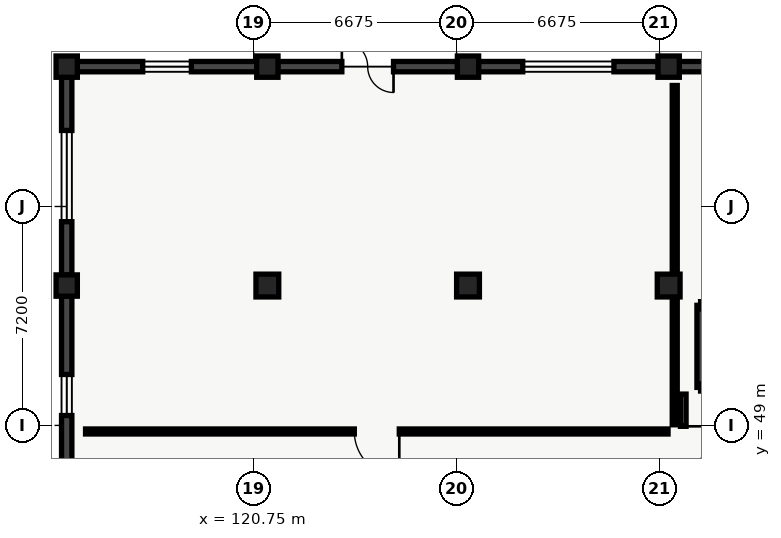
"""IFC4 building model, lengths in metres.
Left out: names, types, materials, properties, quantities, classifications, styles, units other than length and angle.
Written with IfcOpenShell. Run it as: python <this file> out.ifc"""

import sys

from ifc_helpers import new_model, si_unit, direction, frame, frame_2d, origin, origin_2d, place, context, subcontext, project, spatial, rectangle, extrude, element, fill, save


model = new_model("IFC4")
c1 = context("Model", 3, precision=1e-05, world=origin(), true_north=direction((0.0, 1.0)))
c2 = subcontext(c1, "Body", "Model", "MODEL_VIEW")
j1 = project(units=[si_unit("LENGTHUNIT", "METRE"), si_unit("PLANEANGLEUNIT", "RADIAN")], contexts=[c1])
p1 = place(None, origin())
s1 = spatial("IfcSite", under=j1, at=p1, CompositionType="ELEMENT")
p2 = place(p1, origin())
s2 = spatial("IfcBuilding", under=s1, at=p2, CompositionType="ELEMENT")
p3 = place(p2, origin())
s3 = spatial("IfcBuildingStorey", under=s2, at=p3, CompositionType="ELEMENT", Elevation=0.0)
for number, where, z_axis, x_axis in (
    (1, (114.6, 53.6, 0.0), (0.0, 0.0, 1.0), (1.0, 0.0, 0.0)),
    (2, (114.6, 60.8, 0.0), (0.0, 0.0, 1.0), (1.0, 0.0, 0.0)),
):
    element("IfcColumn", number, at=place(p3, frame(where, z_axis=z_axis, x_axis=x_axis)), inside=s3, PredefinedType="COLUMN", context=c2, shape_type="SweptSolid", body=[
        extrude(rectangle(XDim=0.7, YDim=0.7, at=origin_2d()), origin(), (0.0, 0.0, 1.0), 4.9),
    ])
p4 = place(p3, frame((121.2, 53.6, 0.0), z_axis=(0.0, 0.0, 1.0), x_axis=(1.0, 0.0, 0.0)))
e3 = element("IfcColumn", 3, at=p4, inside=s3, PredefinedType="COLUMN", context=c2, shape_type="SweptSolid", body=[
    extrude(rectangle(XDim=0.75, YDim=0.75, at=origin_2d()), origin(), (0.0, 0.0, 1.0), 4.9),
])
p5 = place(p3, frame((121.2, 60.8, 0.0), z_axis=(0.0, 0.0, 1.0), x_axis=(1.0, 0.0, 0.0)))
e4 = element("IfcColumn", 4, at=p5, inside=s3, PredefinedType="COLUMN", context=c2, shape_type="SweptSolid", body=[
    extrude(rectangle(XDim=0.7, YDim=0.7, at=origin_2d()), origin(), (0.0, 0.0, 1.0), 4.9),
])
p6 = place(p3, frame((127.8, 53.6, 0.0), z_axis=(0.0, 0.0, 1.0), x_axis=(1.0, 0.0, 0.0)))
e5 = element("IfcColumn", 5, at=p6, inside=s3, PredefinedType="COLUMN", context=c2, shape_type="SweptSolid", body=[
    extrude(rectangle(XDim=0.75, YDim=0.75, at=origin_2d()), origin(), (0.0, 0.0, 1.0), 4.9),
])
p7 = place(p3, frame((127.8, 60.8, 0.0), z_axis=(0.0, 0.0, 1.0), x_axis=(1.0, 0.0, 0.0)))
e6 = element("IfcColumn", 6, at=p7, inside=s3, PredefinedType="COLUMN", context=c2, shape_type="SweptSolid", body=[
    extrude(rectangle(XDim=0.7, YDim=0.7, at=origin_2d()), origin(), (0.0, 0.0, 1.0), 4.9),
])
p8 = place(p3, frame((134.4, 53.6, 0.0), z_axis=(0.0, 0.0, 1.0), x_axis=(1.0, 0.0, 0.0)))
e7 = element("IfcColumn", 7, at=p8, inside=s3, PredefinedType="COLUMN", context=c2, shape_type="SweptSolid", body=[
    extrude(rectangle(XDim=0.75, YDim=0.75, at=origin_2d()), origin(), (0.0, 0.0, 1.0), 4.9),
])
p9 = place(p3, frame((134.4, 60.8, 0.0), z_axis=(0.0, 0.0, 1.0), x_axis=(1.0, 0.0, 0.0)))
e8 = element("IfcColumn", 8, at=p9, inside=s3, PredefinedType="COLUMN", context=c2, shape_type="SweptSolid", body=[
    extrude(rectangle(XDim=0.7, YDim=0.7, at=origin_2d()), origin(), (0.0, 0.0, 1.0), 4.9),
])
p10 = place(p3, frame((114.6, 46.745, 0.0), z_axis=(0.0, 0.0, 1.0), x_axis=(0.0, 1.0, 0.0)))
e9 = element("IfcWall", 9, at=p10, inside=s3, PredefinedType="SOLIDWALL", context=c2, shape_type="SweptSolid", body=[
    extrude(rectangle(XDim=6.51, YDim=0.34, at=frame_2d((3.255, 0.0))), origin(), (0.0, 0.0, 1.0), 4.435),
])
p11 = place(p10, frame((2.58, 0.0, 0.95)))
e10 = element("IfcOpeningElement", 10, at=p11, cuts=e9, PredefinedType="OPENING", context=c2, shape_type="SweptSolid", body=[
    extrude(rectangle(XDim=1.35, YDim=1.8, at=frame_2d((0.675, 0.9))), frame((0.0, 0.17, 0.0), z_axis=(0.0, -1.0, 0.0), x_axis=(1.0, 0.0, 0.0)), (0.0, 0.0, 1.0), 0.34),
])
p12 = place(p3, frame((114.6, 53.945, 0.0), z_axis=(0.0, 0.0, 1.0), x_axis=(0.0, 1.0, 0.0)))
e11 = element("IfcWall", 11, at=p12, inside=s3, PredefinedType="SOLIDWALL", context=c2, shape_type="SweptSolid", body=[
    extrude(rectangle(XDim=6.51, YDim=0.34, at=frame_2d((3.255, 0.0))), origin(), (0.0, 0.0, 1.0), 4.435),
])
p13 = place(p12, frame((1.755, 0.0, 0.95)))
e12 = element("IfcOpeningElement", 12, at=p13, cuts=e11, PredefinedType="OPENING", context=c2, shape_type="SweptSolid", body=[
    extrude(rectangle(XDim=3.0, YDim=1.65, at=frame_2d((1.5, 0.825))), frame((0.0, 0.17, 0.0), z_axis=(0.0, -1.0, 0.0), x_axis=(1.0, 0.0, 0.0)), (0.0, 0.0, 1.0), 0.34),
])
p14 = place(p3, frame((114.945, 60.8, 0.0), z_axis=(0.0, 0.0, 1.0), x_axis=(1.0, 0.0, 0.0)))
e13 = element("IfcWall", 13, at=p14, inside=s3, PredefinedType="SOLIDWALL", context=c2, shape_type="SweptSolid", body=[
    extrude(rectangle(XDim=5.91, YDim=0.34, at=frame_2d((2.955, 0.0))), origin(), (0.0, 0.0, 1.0), 4.435),
])
p15 = place(p14, frame((2.155, 0.0, 0.95)))
e14 = element("IfcOpeningElement", 14, at=p15, cuts=e13, PredefinedType="OPENING", context=c2, shape_type="SweptSolid", body=[
    extrude(rectangle(XDim=1.6, YDim=1.4, at=frame_2d((0.8, 0.7))), frame((0.0, 0.17, 0.0), z_axis=(0.0, -1.0, 0.0), x_axis=(1.0, 0.0, 0.0)), (0.0, 0.0, 1.0), 0.34),
])
p16 = place(p3, frame((121.545, 60.8, 0.0), z_axis=(0.0, 0.0, 1.0), x_axis=(1.0, 0.0, 0.0)))
e15 = element("IfcWall", 15, at=p16, inside=s3, PredefinedType="SOLIDWALL", context=c2, shape_type="SweptSolid", body=[
    extrude(rectangle(XDim=5.91, YDim=0.34, at=frame_2d((2.955, 0.0))), origin(), (0.0, 0.0, 1.0), 4.435),
])
p17 = place(p16, frame((2.105, 0.0, 0.0)))
e16 = element("IfcOpeningElement", 16, at=p17, cuts=e15, PredefinedType="OPENING", context=c2, shape_type="SweptSolid", body=[
    extrude(rectangle(XDim=1.7, YDim=2.2, at=frame_2d((0.85, 1.1))), frame((0.0, 0.17, 0.0), z_axis=(0.0, -1.0, 0.0), x_axis=(1.0, 0.0, 0.0)), (0.0, 0.0, 1.0), 0.34),
])
p18 = place(p3, frame((128.145, 60.8, 0.0), z_axis=(0.0, 0.0, 1.0), x_axis=(1.0, 0.0, 0.0)))
e17 = element("IfcWall", 17, at=p18, inside=s3, PredefinedType="SOLIDWALL", context=c2, shape_type="SweptSolid", body=[
    extrude(rectangle(XDim=5.91, YDim=0.34, at=frame_2d((2.955, 0.0))), origin(), (0.0, 0.0, 1.0), 4.435),
])
p19 = place(p18, frame((1.455, 0.0, 0.95)))
e18 = element("IfcOpeningElement", 18, at=p19, cuts=e17, PredefinedType="OPENING", context=c2, shape_type="SweptSolid", body=[
    extrude(rectangle(XDim=3.0, YDim=1.65, at=frame_2d((1.5, 0.825))), frame((0.0, 0.17, 0.0), z_axis=(0.0, -1.0, 0.0), x_axis=(1.0, 0.0, 0.0)), (0.0, 0.0, 1.0), 0.34),
])
p20 = place(p3, frame((134.745, 60.8, 0.0), z_axis=(0.0, 0.0, 1.0), x_axis=(1.0, 0.0, 0.0)))
e19 = element("IfcWall", 19, at=p20, inside=s3, PredefinedType="SOLIDWALL", context=c2, shape_type="SweptSolid", body=[
    extrude(rectangle(XDim=5.91, YDim=0.34, at=frame_2d((2.955, 0.0))), origin(), (0.0, 0.0, 1.0), 4.435),
])
p21 = place(p20, frame((2.43, 0.0, 0.95)))
e20 = element("IfcOpeningElement", 20, at=p21, cuts=e19, PredefinedType="OPENING", context=c2, shape_type="SweptSolid", body=[
    extrude(rectangle(XDim=1.05, YDim=1.2, at=frame_2d((0.525, 0.6))), frame((0.0, 0.17, 0.0), z_axis=(0.0, -1.0, 0.0), x_axis=(1.0, 0.0, 0.0)), (0.0, 0.0, 1.0), 0.34),
])
p22 = place(p3, frame((135.45, 50.25, 0.0), z_axis=(0.0, 0.0, 1.0), x_axis=(0.0, 1.0, 0.0)))
e21 = element("IfcWall", 21, at=p22, inside=s3, PredefinedType="SHEAR", context=c2, shape_type="SweptSolid", body=[
    extrude(rectangle(XDim=2.7, YDim=0.24, at=frame_2d((1.35, 0.0))), origin(), (0.0, 0.0, 1.0), 4.88),
])
p23 = place(p3, frame((135.45, 52.95, 0.0), z_axis=(0.0, 0.0, 1.0), x_axis=(1.0, 0.0, 0.0)))
e22 = element("IfcWall", 22, at=p23, inside=s3, PredefinedType="SHEAR", context=c2, shape_type="SweptSolid", body=[
    extrude(rectangle(XDim=1.9, YDim=0.24, at=frame_2d((0.95, 0.0))), origin(), (0.0, 0.0, 1.0), 4.88),
])
p24 = place(p3, frame((137.35, 50.25, 0.0), z_axis=(0.0, 0.0, 1.0), x_axis=(-1.0, 0.0, 0.0)))
e23 = element("IfcWall", 23, at=p24, inside=s3, PredefinedType="SHEAR", context=c2, shape_type="SweptSolid", body=[
    extrude(rectangle(XDim=1.9, YDim=0.24, at=frame_2d((0.95, 0.0))), origin(), (0.0, 0.0, 1.0), 4.88),
])
p25 = place(p24, frame((0.325, 0.0, 0.0)))
e24 = element("IfcOpeningElement", 24, at=p25, cuts=e23, PredefinedType="OPENING", context=c2, shape_type="SweptSolid", body=[
    extrude(rectangle(XDim=1.25, YDim=2.2, at=frame_2d((0.625, 1.1))), frame((0.0, 0.12, 0.0), z_axis=(0.0, -1.0, 0.0), x_axis=(1.0, 0.0, 0.0)), (0.0, 0.0, 1.0), 0.24),
])
p26 = place(p3, frame((134.88, 50.03, 0.0), z_axis=(0.0, 0.0, 1.0), x_axis=(0.0, -1.0, 0.0)))
e25 = element("IfcWall", 25, at=p26, inside=s3, PredefinedType="SOLIDWALL", context=c2, shape_type="SweptSolid", body=[
    extrude(rectangle(XDim=2.51, YDim=0.185, at=frame_2d((1.255, 0.0))), origin(), (0.0, 0.0, 1.0), 4.55),
])
p27 = place(p26, frame((1.06, 0.0, 0.0)))
e26 = element("IfcOpeningElement", 26, at=p27, cuts=e25, PredefinedType="OPENING", context=c2, shape_type="SweptSolid", body=[
    extrude(rectangle(XDim=1.2, YDim=2.15, at=frame_2d((0.6, 1.075))), frame((0.0, 0.093, 0.0), z_axis=(0.0, -1.0, 0.0), x_axis=(1.0, 0.0, 0.0)), (0.0, 0.0, 1.0), 0.185),
])
p28 = place(p3, frame((115.22, 48.8, 0.0), z_axis=(0.0, 0.0, 1.0), x_axis=(1.0, 0.0, 0.0)))
e27 = element("IfcWall", 27, at=p28, inside=s3, PredefinedType="PARTITIONING", context=c2, shape_type="SweptSolid", body=[
    extrude(rectangle(XDim=19.16, YDim=0.165, at=frame_2d((9.58, 0.0))), origin(), (0.0, 0.0, 1.0), 4.485),
])
p29 = place(p28, frame((8.84, 0.0, 0.0)))
e28 = element("IfcOpeningElement", 28, at=p29, cuts=e27, PredefinedType="OPENING", context=c2, shape_type="SweptSolid", body=[
    extrude(rectangle(XDim=1.48, YDim=2.1, at=frame_2d((0.74, 1.05))), frame((0.0, 0.083, 0.0), z_axis=(0.0, -1.0, 0.0), x_axis=(1.0, 0.0, 0.0)), (0.0, 0.0, 1.0), 0.165),
])
p30 = place(p3, frame((134.6, 49.02, 0.0), z_axis=(0.0, 0.0, 1.0), x_axis=(0.0, 1.0, 0.0)))
e29 = element("IfcWall", 29, at=p30, inside=s3, PredefinedType="PARTITIONING", context=c2, shape_type="SweptSolid", body=[
    extrude(rectangle(XDim=11.16, YDim=0.165, at=frame_2d((5.58, 0.0))), origin(), (0.0, 0.0, 1.0), 4.235),
])
p31 = place(p11, origin())
e30 = element("IfcWindow", 30, at=p31, inside=s3, PartitioningType="SINGLE_PANEL", PredefinedType="WINDOW", context=c2, shape_type="SweptSolid", body=[
    extrude(rectangle(XDim=1.35, YDim=1.8, at=frame_2d((0.675, 0.9))), frame((0.0, 0.03, 0.0), z_axis=(0.0, -1.0, 0.0), x_axis=(1.0, 0.0, 0.0)), (0.0, 0.0, 1.0), 0.06),
])
fill(e10, e30)
p32 = place(p13, origin())
e31 = element("IfcWindow", 31, at=p32, inside=s3, PartitioningType="SINGLE_PANEL", PredefinedType="WINDOW", context=c2, shape_type="SweptSolid", body=[
    extrude(rectangle(XDim=3.0, YDim=1.65, at=frame_2d((1.5, 0.825))), frame((0.0, 0.03, 0.0), z_axis=(0.0, -1.0, 0.0), x_axis=(1.0, 0.0, 0.0)), (0.0, 0.0, 1.0), 0.06),
])
fill(e12, e31)
p33 = place(p15, origin())
e32 = element("IfcWindow", 32, at=p33, inside=s3, PartitioningType="SINGLE_PANEL", PredefinedType="WINDOW", context=c2, shape_type="SweptSolid", body=[
    extrude(rectangle(XDim=1.6, YDim=1.4, at=frame_2d((0.8, 0.7))), frame((0.0, 0.03, 0.0), z_axis=(0.0, -1.0, 0.0), x_axis=(1.0, 0.0, 0.0)), (0.0, 0.0, 1.0), 0.06),
])
fill(e14, e32)
p34 = place(p17, origin())
e33 = element("IfcDoor", 33, at=p34, inside=s3, OperationType="DOUBLE_DOOR_SINGLE_SWING", PredefinedType="DOOR", context=c2, shape_type="SweptSolid", body=[
    extrude(rectangle(XDim=1.7, YDim=2.2, at=frame_2d((0.85, 1.1))), frame((0.0, 0.025, 0.0), z_axis=(0.0, -1.0, 0.0), x_axis=(1.0, 0.0, 0.0)), (0.0, 0.0, 1.0), 0.05),
])
fill(e16, e33)
p35 = place(p19, origin())
e34 = element("IfcWindow", 34, at=p35, inside=s3, PartitioningType="SINGLE_PANEL", PredefinedType="WINDOW", context=c2, shape_type="SweptSolid", body=[
    extrude(rectangle(XDim=3.0, YDim=1.65, at=frame_2d((1.5, 0.825))), frame((0.0, 0.03, 0.0), z_axis=(0.0, -1.0, 0.0), x_axis=(1.0, 0.0, 0.0)), (0.0, 0.0, 1.0), 0.06),
])
fill(e18, e34)
p36 = place(p27, origin())
e35 = element("IfcDoor", 35, at=p36, inside=s3, OperationType="SINGLE_SWING_LEFT", PredefinedType="DOOR", context=c2, shape_type="SweptSolid", body=[
    extrude(rectangle(XDim=1.2, YDim=2.15, at=frame_2d((0.6, 1.075))), frame((0.0, 0.025, 0.0), z_axis=(0.0, -1.0, 0.0), x_axis=(1.0, 0.0, 0.0)), (0.0, 0.0, 1.0), 0.05),
])
fill(e26, e35)
p37 = place(p29, origin())
e36 = element("IfcDoor", 36, at=p37, inside=s3, OperationType="SINGLE_SWING_RIGHT", PredefinedType="DOOR", context=c2, shape_type="SweptSolid", body=[
    extrude(rectangle(XDim=1.48, YDim=2.1, at=frame_2d((0.74, 1.05))), frame((0.0, 0.025, 0.0), z_axis=(0.0, -1.0, 0.0), x_axis=(1.0, 0.0, 0.0)), (0.0, 0.0, 1.0), 0.05),
])
fill(e28, e36)
save(model, sys.argv[1])
